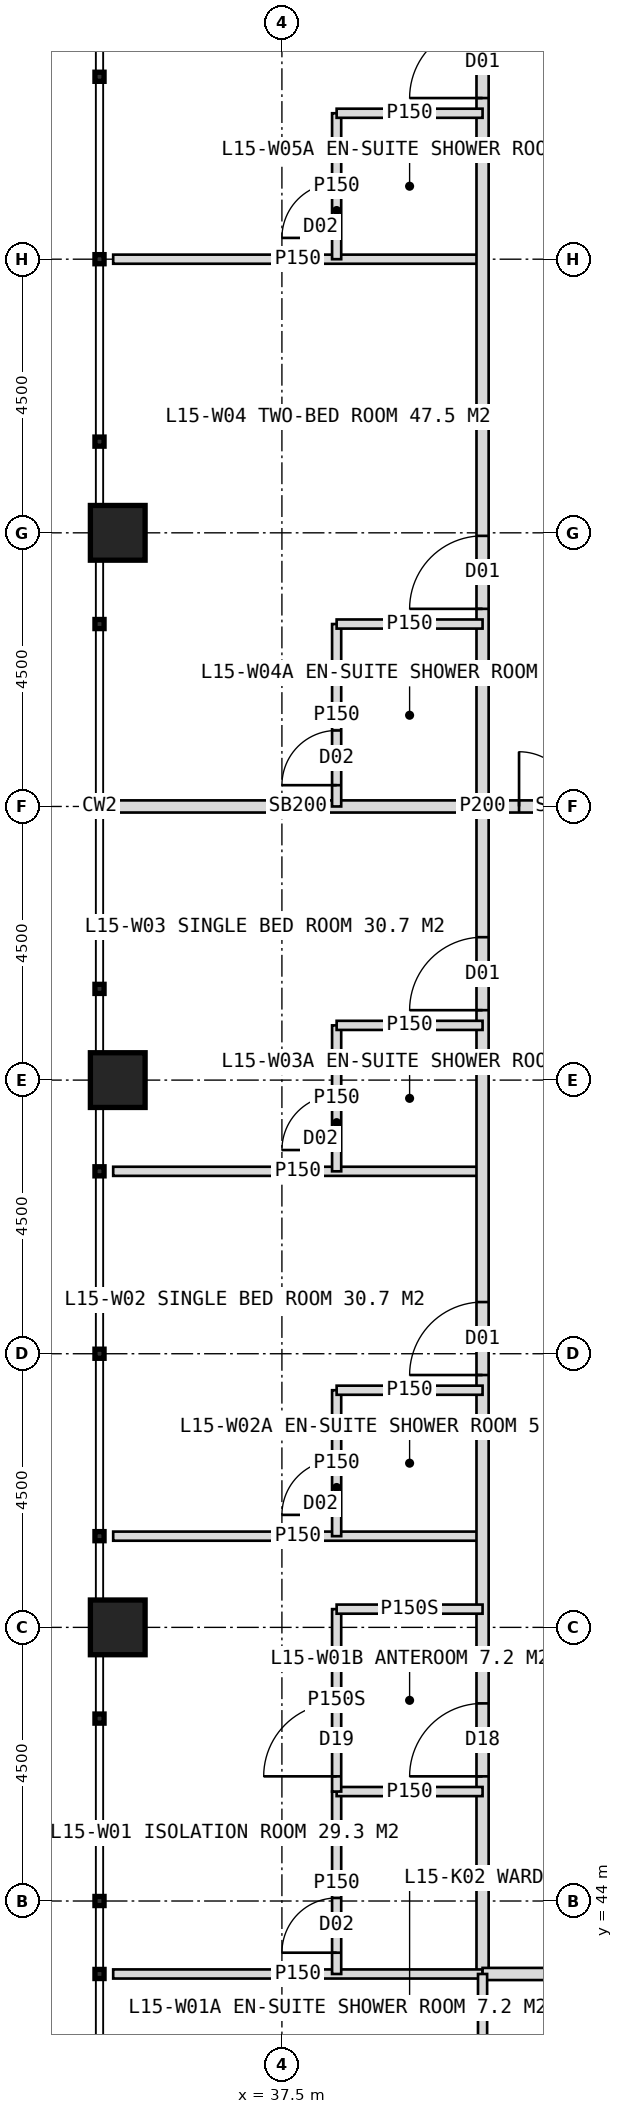
"""IFC4 building model, lengths in metres.
Left out: names, types, materials, properties, quantities, classifications, styles, units other than length and angle.
Written with IfcOpenShell. Run it as: python <this file> out.ifc"""

import sys

from ifc_helpers import new_model, si_unit, direction, frame, frame_2d, origin, origin_2d, place, context, subcontext, project, spatial, rectangle, hollow_rectangle, extrude, element, fill, save


model = new_model("IFC4")
c1 = context("Model", 3, precision=1e-05, world=origin(), true_north=direction((0.0, 1.0)))
c2 = subcontext(c1, "Body", "Model", "MODEL_VIEW")
j1 = project(units=[si_unit("LENGTHUNIT", "METRE"), si_unit("PLANEANGLEUNIT", "RADIAN")], contexts=[c1])
p1 = place(None, origin())
s1 = spatial("IfcSite", under=j1, at=p1, CompositionType="ELEMENT")
p2 = place(p1, origin())
s2 = spatial("IfcBuilding", under=s1, at=p2, CompositionType="ELEMENT")
p3 = place(p2, frame((0.0, 0.0, 67.0)))
s3 = spatial("IfcBuildingStorey", under=s2, at=p3, CompositionType="ELEMENT", Elevation=67.0)
for number, where, z_axis, x_axis in (
    (1, (34.8, 48.5, 0.0), (0.0, 0.0, 1.0), (1.0, 0.0, 0.0)),
    (2, (34.8, 57.5, 0.0), (0.0, 0.0, 1.0), (1.0, 0.0, 0.0)),
    (3, (34.8, 66.5, 0.0), (0.0, 0.0, 1.0), (1.0, 0.0, 0.0)),
):
    element("IfcColumn", number, at=place(p3, frame(where, z_axis=z_axis, x_axis=x_axis)), inside=s3, PredefinedType="COLUMN", context=c2, shape_type="SweptSolid", body=[
        extrude(hollow_rectangle(XDim=0.9, YDim=0.9, WallThickness=0.08, at=origin_2d()), origin(), (0.0, 0.0, 1.0), 4.0),
    ])
for number, where, z_axis, x_axis in (
    (4, (40.8, 50.0, 0.0), (0.0, 0.0, 1.0), (-1.0, 0.0, 0.0)),
    (5, (40.8, 56.0, 0.0), (0.0, 0.0, 1.0), (-1.0, 0.0, 0.0)),
):
    element("IfcWall", number, at=place(p3, frame(where, z_axis=z_axis, x_axis=x_axis)), inside=s3, PredefinedType="PARTITIONING", context=c2, shape_type="SweptSolid", body=[
        extrude(rectangle(XDim=6.075, YDim=0.15, at=frame_2d((3.038, 0.0))), origin(), (0.0, 0.0, 1.0), 3.75),
    ])
p4 = place(p3, frame((40.8, 62.0, 0.0), z_axis=(0.0, 0.0, 1.0), x_axis=(-1.0, 0.0, 0.0)))
e6 = element("IfcWall", 6, at=p4, inside=s3, PredefinedType="SOLIDWALL", context=c2, shape_type="SweptSolid", body=[
    extrude(rectangle(XDim=6.075, YDim=0.2, at=frame_2d((3.038, 0.0))), origin(), (0.0, 0.0, 1.0), 2.75),
])
p5 = place(p3, frame((40.8, 71.0, 0.0), z_axis=(0.0, 0.0, 1.0), x_axis=(-1.0, 0.0, 0.0)))
e7 = element("IfcWall", 7, at=p5, inside=s3, PredefinedType="PARTITIONING", context=c2, shape_type="SweptSolid", body=[
    extrude(rectangle(XDim=6.075, YDim=0.15, at=frame_2d((3.038, 0.0))), origin(), (0.0, 0.0, 1.0), 3.75),
])
p6 = place(p3, frame((40.8, 42.8, 0.0), z_axis=(0.0, 0.0, 1.0), x_axis=(0.0, 1.0, 0.0)))
e8 = element("IfcWall", 8, at=p6, inside=s3, PredefinedType="PARTITIONING", context=c2, shape_type="SweptSolid", body=[
    extrude(rectangle(XDim=38.4, YDim=0.2, at=frame_2d((19.2, 0.0))), origin(), (0.0, 0.0, 1.0), 3.75),
])
p7 = place(p6, frame((3.25, 0.0, 0.0)))
e9 = element("IfcOpeningElement", 9, at=p7, cuts=e8, PredefinedType="OPENING", context=c2, shape_type="SweptSolid", body=[
    extrude(rectangle(XDim=1.2, YDim=2.2, at=frame_2d((0.6, 1.1))), frame((0.0, 0.11, 0.0), z_axis=(0.0, -1.0, 0.0), x_axis=(1.0, 0.0, 0.0)), (0.0, 0.0, 1.0), 0.22),
])
p8 = place(p6, frame((9.85, 0.0, 0.0)))
e10 = element("IfcOpeningElement", 10, at=p8, cuts=e8, PredefinedType="OPENING", context=c2, shape_type="SweptSolid", body=[
    extrude(rectangle(XDim=1.2, YDim=2.2, at=frame_2d((0.6, 1.1))), frame((0.0, 0.11, 0.0), z_axis=(0.0, -1.0, 0.0), x_axis=(1.0, 0.0, 0.0)), (0.0, 0.0, 1.0), 0.22),
])
p9 = place(p6, frame((15.85, 0.0, 0.0)))
e11 = element("IfcOpeningElement", 11, at=p9, cuts=e8, PredefinedType="OPENING", context=c2, shape_type="SweptSolid", body=[
    extrude(rectangle(XDim=1.2, YDim=2.2, at=frame_2d((0.6, 1.1))), frame((0.0, 0.11, 0.0), z_axis=(0.0, -1.0, 0.0), x_axis=(1.0, 0.0, 0.0)), (0.0, 0.0, 1.0), 0.22),
])
p10 = place(p6, frame((22.45, 0.0, 0.0)))
e12 = element("IfcOpeningElement", 12, at=p10, cuts=e8, PredefinedType="OPENING", context=c2, shape_type="SweptSolid", body=[
    extrude(rectangle(XDim=1.2, YDim=2.2, at=frame_2d((0.6, 1.1))), frame((0.0, 0.11, 0.0), z_axis=(0.0, -1.0, 0.0), x_axis=(1.0, 0.0, 0.0)), (0.0, 0.0, 1.0), 0.22),
])
p11 = place(p6, frame((30.85, 0.0, 0.0)))
e13 = element("IfcOpeningElement", 13, at=p11, cuts=e8, PredefinedType="OPENING", context=c2, shape_type="SweptSolid", body=[
    extrude(rectangle(XDim=1.2, YDim=2.2, at=frame_2d((0.6, 1.1))), frame((0.0, 0.11, 0.0), z_axis=(0.0, -1.0, 0.0), x_axis=(1.0, 0.0, 0.0)), (0.0, 0.0, 1.0), 0.22),
])
p12 = place(p3, frame((40.8, 42.8, 0.0), z_axis=(0.0, 0.0, 1.0), x_axis=(-1.0, 0.0, 0.0)))
e14 = element("IfcWall", 14, at=p12, inside=s3, PredefinedType="PARTITIONING", context=c2, shape_type="SweptSolid", body=[
    extrude(rectangle(XDim=6.075, YDim=0.15, at=frame_2d((3.038, 0.0))), origin(), (0.0, 0.0, 1.0), 3.75),
])
p13 = place(p3, frame((38.4, 42.8, 0.0), z_axis=(0.0, 0.0, 1.0), x_axis=(0.0, 1.0, 0.0)))
e15 = element("IfcWall", 15, at=p13, inside=s3, PredefinedType="PARTITIONING", context=c2, shape_type="SweptSolid", body=[
    extrude(rectangle(XDim=3.0, YDim=0.15, at=frame_2d((1.5, 0.0))), origin(), (0.0, 0.0, 1.0), 3.75),
])
p14 = place(p13, frame((0.35, 0.0, 0.0)))
e16 = element("IfcOpeningElement", 16, at=p14, cuts=e15, PredefinedType="OPENING", context=c2, shape_type="SweptSolid", body=[
    extrude(rectangle(XDim=0.9, YDim=2.1, at=frame_2d((0.45, 1.05))), frame((0.0, 0.085, 0.0), z_axis=(0.0, -1.0, 0.0), x_axis=(1.0, 0.0, 0.0)), (0.0, 0.0, 1.0), 0.17),
])
p15 = place(p3, frame((40.8, 45.8, 0.0), z_axis=(0.0, 0.0, 1.0), x_axis=(-1.0, 0.0, 0.0)))
e17 = element("IfcWall", 17, at=p15, inside=s3, PredefinedType="PARTITIONING", context=c2, shape_type="SweptSolid", body=[
    extrude(rectangle(XDim=2.4, YDim=0.15, at=frame_2d((1.2, 0.0))), origin(), (0.0, 0.0, 1.0), 3.75),
])
p16 = place(p3, frame((38.4, 45.8, 0.0), z_axis=(0.0, 0.0, 1.0), x_axis=(0.0, 1.0, 0.0)))
e18 = element("IfcWall", 18, at=p16, inside=s3, PredefinedType="PARTITIONING", context=c2, shape_type="SweptSolid", body=[
    extrude(rectangle(XDim=3.0, YDim=0.15, at=frame_2d((1.5, 0.0))), origin(), (0.0, 0.0, 1.0), 3.75),
])
p17 = place(p16, frame((0.25, 0.0, 0.0)))
e19 = element("IfcOpeningElement", 19, at=p17, cuts=e18, PredefinedType="OPENING", context=c2, shape_type="SweptSolid", body=[
    extrude(rectangle(XDim=1.2, YDim=2.2, at=frame_2d((0.6, 1.1))), frame((0.0, 0.085, 0.0), z_axis=(0.0, -1.0, 0.0), x_axis=(1.0, 0.0, 0.0)), (0.0, 0.0, 1.0), 0.17),
])
p18 = place(p3, frame((40.8, 48.8, 0.0), z_axis=(0.0, 0.0, 1.0), x_axis=(-1.0, 0.0, 0.0)))
e20 = element("IfcWall", 20, at=p18, inside=s3, PredefinedType="PARTITIONING", context=c2, shape_type="SweptSolid", body=[
    extrude(rectangle(XDim=2.4, YDim=0.15, at=frame_2d((1.2, 0.0))), origin(), (0.0, 0.0, 1.0), 3.75),
])
p19 = place(p3, frame((38.4, 50.0, 0.0), z_axis=(0.0, 0.0, 1.0), x_axis=(0.0, 1.0, 0.0)))
e21 = element("IfcWall", 21, at=p19, inside=s3, PredefinedType="PARTITIONING", context=c2, shape_type="SweptSolid", body=[
    extrude(rectangle(XDim=2.4, YDim=0.15, at=frame_2d((1.2, 0.0))), origin(), (0.0, 0.0, 1.0), 3.75),
])
p20 = place(p19, frame((0.35, 0.0, 0.0)))
e22 = element("IfcOpeningElement", 22, at=p20, cuts=e21, PredefinedType="OPENING", context=c2, shape_type="SweptSolid", body=[
    extrude(rectangle(XDim=0.9, YDim=2.1, at=frame_2d((0.45, 1.05))), frame((0.0, 0.085, 0.0), z_axis=(0.0, -1.0, 0.0), x_axis=(1.0, 0.0, 0.0)), (0.0, 0.0, 1.0), 0.17),
])
p21 = place(p3, frame((40.8, 52.4, 0.0), z_axis=(0.0, 0.0, 1.0), x_axis=(-1.0, 0.0, 0.0)))
e23 = element("IfcWall", 23, at=p21, inside=s3, PredefinedType="PARTITIONING", context=c2, shape_type="SweptSolid", body=[
    extrude(rectangle(XDim=2.4, YDim=0.15, at=frame_2d((1.2, 0.0))), origin(), (0.0, 0.0, 1.0), 3.75),
])
p22 = place(p3, frame((38.4, 56.0, 0.0), z_axis=(0.0, 0.0, 1.0), x_axis=(0.0, 1.0, 0.0)))
e24 = element("IfcWall", 24, at=p22, inside=s3, PredefinedType="PARTITIONING", context=c2, shape_type="SweptSolid", body=[
    extrude(rectangle(XDim=2.4, YDim=0.15, at=frame_2d((1.2, 0.0))), origin(), (0.0, 0.0, 1.0), 3.75),
])
p23 = place(p22, frame((0.35, 0.0, 0.0)))
e25 = element("IfcOpeningElement", 25, at=p23, cuts=e24, PredefinedType="OPENING", context=c2, shape_type="SweptSolid", body=[
    extrude(rectangle(XDim=0.9, YDim=2.1, at=frame_2d((0.45, 1.05))), frame((0.0, 0.085, 0.0), z_axis=(0.0, -1.0, 0.0), x_axis=(1.0, 0.0, 0.0)), (0.0, 0.0, 1.0), 0.17),
])
p24 = place(p3, frame((40.8, 58.4, 0.0), z_axis=(0.0, 0.0, 1.0), x_axis=(-1.0, 0.0, 0.0)))
e26 = element("IfcWall", 26, at=p24, inside=s3, PredefinedType="PARTITIONING", context=c2, shape_type="SweptSolid", body=[
    extrude(rectangle(XDim=2.4, YDim=0.15, at=frame_2d((1.2, 0.0))), origin(), (0.0, 0.0, 1.0), 3.75),
])
p25 = place(p3, frame((38.4, 62.0, 0.0), z_axis=(0.0, 0.0, 1.0), x_axis=(0.0, 1.0, 0.0)))
e27 = element("IfcWall", 27, at=p25, inside=s3, PredefinedType="PARTITIONING", context=c2, shape_type="SweptSolid", body=[
    extrude(rectangle(XDim=3.0, YDim=0.15, at=frame_2d((1.5, 0.0))), origin(), (0.0, 0.0, 1.0), 3.75),
])
p26 = place(p25, frame((0.35, 0.0, 0.0)))
e28 = element("IfcOpeningElement", 28, at=p26, cuts=e27, PredefinedType="OPENING", context=c2, shape_type="SweptSolid", body=[
    extrude(rectangle(XDim=0.9, YDim=2.1, at=frame_2d((0.45, 1.05))), frame((0.0, 0.085, 0.0), z_axis=(0.0, -1.0, 0.0), x_axis=(1.0, 0.0, 0.0)), (0.0, 0.0, 1.0), 0.17),
])
p27 = place(p3, frame((40.8, 65.0, 0.0), z_axis=(0.0, 0.0, 1.0), x_axis=(-1.0, 0.0, 0.0)))
e29 = element("IfcWall", 29, at=p27, inside=s3, PredefinedType="PARTITIONING", context=c2, shape_type="SweptSolid", body=[
    extrude(rectangle(XDim=2.4, YDim=0.15, at=frame_2d((1.2, 0.0))), origin(), (0.0, 0.0, 1.0), 3.75),
])
p28 = place(p3, frame((38.4, 71.0, 0.0), z_axis=(0.0, 0.0, 1.0), x_axis=(0.0, 1.0, 0.0)))
e30 = element("IfcWall", 30, at=p28, inside=s3, PredefinedType="PARTITIONING", context=c2, shape_type="SweptSolid", body=[
    extrude(rectangle(XDim=2.4, YDim=0.15, at=frame_2d((1.2, 0.0))), origin(), (0.0, 0.0, 1.0), 3.75),
])
p29 = place(p28, frame((0.35, 0.0, 0.0)))
e31 = element("IfcOpeningElement", 31, at=p29, cuts=e30, PredefinedType="OPENING", context=c2, shape_type="SweptSolid", body=[
    extrude(rectangle(XDim=0.9, YDim=2.1, at=frame_2d((0.45, 1.05))), frame((0.0, 0.085, 0.0), z_axis=(0.0, -1.0, 0.0), x_axis=(1.0, 0.0, 0.0)), (0.0, 0.0, 1.0), 0.17),
])
p30 = place(p3, frame((40.8, 73.4, 0.0), z_axis=(0.0, 0.0, 1.0), x_axis=(-1.0, 0.0, 0.0)))
e32 = element("IfcWall", 32, at=p30, inside=s3, PredefinedType="PARTITIONING", context=c2, shape_type="SweptSolid", body=[
    extrude(rectangle(XDim=2.4, YDim=0.15, at=frame_2d((1.2, 0.0))), origin(), (0.0, 0.0, 1.0), 3.75),
])
p31 = place(p3, frame((79.2, 42.8, 0.0), z_axis=(0.0, 0.0, 1.0), x_axis=(-1.0, 0.0, 0.0)))
e33 = element("IfcWall", 33, at=p31, inside=s3, PredefinedType="PARTITIONING", context=c2, shape_type="SweptSolid", body=[
    extrude(rectangle(XDim=38.4, YDim=0.2, at=frame_2d((19.2, 0.0))), origin(), (0.0, 0.0, 1.0), 3.75),
])
p32 = place(p31, frame((3.25, 0.0, 0.0)))
e34 = element("IfcOpeningElement", 34, at=p32, cuts=e33, PredefinedType="OPENING", context=c2, shape_type="SweptSolid", body=[
    extrude(rectangle(XDim=1.2, YDim=2.2, at=frame_2d((0.6, 1.1))), frame((0.0, 0.11, 0.0), z_axis=(0.0, -1.0, 0.0), x_axis=(1.0, 0.0, 0.0)), (0.0, 0.0, 1.0), 0.22),
])
p33 = place(p31, frame((13.45, 0.0, 0.0)))
e35 = element("IfcOpeningElement", 35, at=p33, cuts=e33, PredefinedType="OPENING", context=c2, shape_type="SweptSolid", body=[
    extrude(rectangle(XDim=1.2, YDim=2.2, at=frame_2d((0.6, 1.1))), frame((0.0, 0.11, 0.0), z_axis=(0.0, -1.0, 0.0), x_axis=(1.0, 0.0, 0.0)), (0.0, 0.0, 1.0), 0.22),
])
p34 = place(p31, frame((22.45, 0.0, 0.0)))
e36 = element("IfcOpeningElement", 36, at=p34, cuts=e33, PredefinedType="OPENING", context=c2, shape_type="SweptSolid", body=[
    extrude(rectangle(XDim=1.2, YDim=2.2, at=frame_2d((0.6, 1.1))), frame((0.0, 0.11, 0.0), z_axis=(0.0, -1.0, 0.0), x_axis=(1.0, 0.0, 0.0)), (0.0, 0.0, 1.0), 0.22),
])
p35 = place(p31, frame((30.85, 0.0, 0.0)))
e37 = element("IfcOpeningElement", 37, at=p35, cuts=e33, PredefinedType="OPENING", context=c2, shape_type="SweptSolid", body=[
    extrude(rectangle(XDim=1.2, YDim=2.2, at=frame_2d((0.6, 1.1))), frame((0.0, 0.11, 0.0), z_axis=(0.0, -1.0, 0.0), x_axis=(1.0, 0.0, 0.0)), (0.0, 0.0, 1.0), 0.22),
])
p36 = place(p3, frame((40.8, 42.8, 0.0), z_axis=(0.0, 0.0, 1.0), x_axis=(0.0, -1.0, 0.0)))
e38 = element("IfcWall", 38, at=p36, inside=s3, PredefinedType="PARTITIONING", context=c2, shape_type="SweptSolid", body=[
    extrude(rectangle(XDim=2.4, YDim=0.15, at=frame_2d((1.2, 0.0))), origin(), (0.0, 0.0, 1.0), 3.75),
])
p37 = place(p3, frame((43.5, 62.0, 0.0), z_axis=(0.0, 0.0, 1.0), x_axis=(-1.0, 0.0, 0.0)))
e39 = element("IfcWall", 39, at=p37, inside=s3, PredefinedType="SOLIDWALL", context=c2, shape_type="SweptSolid", body=[
    extrude(rectangle(XDim=2.7, YDim=0.2, at=frame_2d((1.35, 0.0))), origin(), (0.0, 0.0, 1.0), 2.75),
])
p38 = place(p37, frame((0.3, 0.0, 0.0)))
e40 = element("IfcOpeningElement", 40, at=p38, cuts=e39, PredefinedType="OPENING", context=c2, shape_type="SweptSolid", body=[
    extrude(rectangle(XDim=1.8, YDim=2.2, at=frame_2d((0.9, 1.1))), frame((0.0, 0.11, 0.0), z_axis=(0.0, -1.0, 0.0), x_axis=(1.0, 0.0, 0.0)), (0.0, 0.0, 1.0), 0.22),
])
p39 = place(p17, origin())
e41 = element("IfcDoor", 41, at=p39, inside=s3, OperationType="SINGLE_SWING_LEFT", PredefinedType="DOOR", context=c2, shape_type="SweptSolid", body=[
    extrude(rectangle(XDim=1.2, YDim=2.2, at=frame_2d((0.6, 1.1))), frame((0.0, 0.025, 0.0), z_axis=(0.0, -1.0, 0.0), x_axis=(1.0, 0.0, 0.0)), (0.0, 0.0, 1.0), 0.05),
])
fill(e19, e41)
p40 = place(p7, origin())
e42 = element("IfcDoor", 42, at=p40, inside=s3, OperationType="SINGLE_SWING_LEFT", PredefinedType="DOOR", context=c2, shape_type="SweptSolid", body=[
    extrude(rectangle(XDim=1.2, YDim=2.2, at=frame_2d((0.6, 1.1))), frame((0.0, 0.025, 0.0), z_axis=(0.0, -1.0, 0.0), x_axis=(1.0, 0.0, 0.0)), (0.0, 0.0, 1.0), 0.05),
])
fill(e9, e42)
p41 = place(p14, origin())
e43 = element("IfcDoor", 43, at=p41, inside=s3, OperationType="SINGLE_SWING_LEFT", PredefinedType="DOOR", context=c2, shape_type="SweptSolid", body=[
    extrude(rectangle(XDim=0.9, YDim=2.1, at=frame_2d((0.45, 1.05))), frame((0.0, 0.025, 0.0), z_axis=(0.0, -1.0, 0.0), x_axis=(1.0, 0.0, 0.0)), (0.0, 0.0, 1.0), 0.05),
])
fill(e16, e43)
p42 = place(p8, origin())
e44 = element("IfcDoor", 44, at=p42, inside=s3, OperationType="SINGLE_SWING_LEFT", PredefinedType="DOOR", context=c2, shape_type="SweptSolid", body=[
    extrude(rectangle(XDim=1.2, YDim=2.2, at=frame_2d((0.6, 1.1))), frame((0.0, 0.025, 0.0), z_axis=(0.0, -1.0, 0.0), x_axis=(1.0, 0.0, 0.0)), (0.0, 0.0, 1.0), 0.05),
])
fill(e10, e44)
p43 = place(p20, origin())
e45 = element("IfcDoor", 45, at=p43, inside=s3, OperationType="SINGLE_SWING_LEFT", PredefinedType="DOOR", context=c2, shape_type="SweptSolid", body=[
    extrude(rectangle(XDim=0.9, YDim=2.1, at=frame_2d((0.45, 1.05))), frame((0.0, 0.025, 0.0), z_axis=(0.0, -1.0, 0.0), x_axis=(1.0, 0.0, 0.0)), (0.0, 0.0, 1.0), 0.05),
])
fill(e22, e45)
p44 = place(p9, origin())
e46 = element("IfcDoor", 46, at=p44, inside=s3, OperationType="SINGLE_SWING_LEFT", PredefinedType="DOOR", context=c2, shape_type="SweptSolid", body=[
    extrude(rectangle(XDim=1.2, YDim=2.2, at=frame_2d((0.6, 1.1))), frame((0.0, 0.025, 0.0), z_axis=(0.0, -1.0, 0.0), x_axis=(1.0, 0.0, 0.0)), (0.0, 0.0, 1.0), 0.05),
])
fill(e11, e46)
p45 = place(p23, origin())
e47 = element("IfcDoor", 47, at=p45, inside=s3, OperationType="SINGLE_SWING_LEFT", PredefinedType="DOOR", context=c2, shape_type="SweptSolid", body=[
    extrude(rectangle(XDim=0.9, YDim=2.1, at=frame_2d((0.45, 1.05))), frame((0.0, 0.025, 0.0), z_axis=(0.0, -1.0, 0.0), x_axis=(1.0, 0.0, 0.0)), (0.0, 0.0, 1.0), 0.05),
])
fill(e25, e47)
p46 = place(p10, origin())
e48 = element("IfcDoor", 48, at=p46, inside=s3, OperationType="SINGLE_SWING_LEFT", PredefinedType="DOOR", context=c2, shape_type="SweptSolid", body=[
    extrude(rectangle(XDim=1.2, YDim=2.2, at=frame_2d((0.6, 1.1))), frame((0.0, 0.025, 0.0), z_axis=(0.0, -1.0, 0.0), x_axis=(1.0, 0.0, 0.0)), (0.0, 0.0, 1.0), 0.05),
])
fill(e12, e48)
p47 = place(p26, origin())
e49 = element("IfcDoor", 49, at=p47, inside=s3, OperationType="SINGLE_SWING_LEFT", PredefinedType="DOOR", context=c2, shape_type="SweptSolid", body=[
    extrude(rectangle(XDim=0.9, YDim=2.1, at=frame_2d((0.45, 1.05))), frame((0.0, 0.025, 0.0), z_axis=(0.0, -1.0, 0.0), x_axis=(1.0, 0.0, 0.0)), (0.0, 0.0, 1.0), 0.05),
])
fill(e28, e49)
p48 = place(p11, origin())
e50 = element("IfcDoor", 50, at=p48, inside=s3, OperationType="SINGLE_SWING_LEFT", PredefinedType="DOOR", context=c2, shape_type="SweptSolid", body=[
    extrude(rectangle(XDim=1.2, YDim=2.2, at=frame_2d((0.6, 1.1))), frame((0.0, 0.025, 0.0), z_axis=(0.0, -1.0, 0.0), x_axis=(1.0, 0.0, 0.0)), (0.0, 0.0, 1.0), 0.05),
])
fill(e13, e50)
p49 = place(p29, origin())
e51 = element("IfcDoor", 51, at=p49, inside=s3, OperationType="SINGLE_SWING_LEFT", PredefinedType="DOOR", context=c2, shape_type="SweptSolid", body=[
    extrude(rectangle(XDim=0.9, YDim=2.1, at=frame_2d((0.45, 1.05))), frame((0.0, 0.025, 0.0), z_axis=(0.0, -1.0, 0.0), x_axis=(1.0, 0.0, 0.0)), (0.0, 0.0, 1.0), 0.05),
])
fill(e31, e51)
p50 = place(p38, origin())
e52 = element("IfcDoor", 52, at=p50, inside=s3, OperationType="DOUBLE_DOOR_DOUBLE_SWING", PredefinedType="DOOR", context=c2, shape_type="SweptSolid", body=[
    extrude(rectangle(XDim=1.8, YDim=2.2, at=frame_2d((0.9, 1.1))), frame((0.0, 0.025, 0.0), z_axis=(0.0, -1.0, 0.0), x_axis=(1.0, 0.0, 0.0)), (0.0, 0.0, 1.0), 0.05),
])
fill(e40, e52)
save(model, sys.argv[1])
